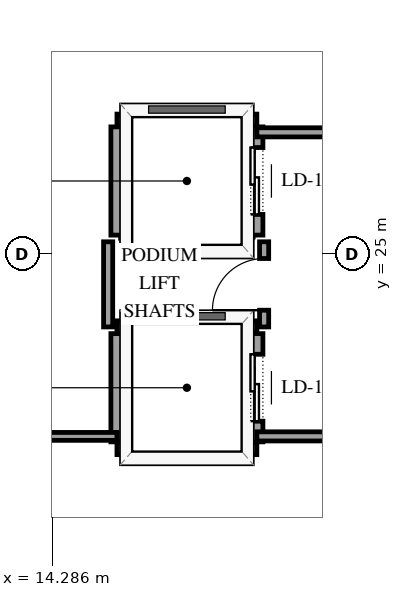
"""IFC4 building model, lengths in metres.
Left out: names, types, materials, properties, quantities, classifications, styles, units other than length and angle.
Written with IfcOpenShell. Run it as: python <this file> out.ifc"""

import sys

from ifc_helpers import new_model, si_unit, direction, frame, frame_2d, origin, place, context, subcontext, project, spatial, rectangle, extrude, element, fill, save


model = new_model("IFC4")
c1 = context("Model", 3, precision=1e-05, world=origin(), true_north=direction((0.0, 1.0)))
c2 = subcontext(c1, "Body", "Model", "MODEL_VIEW")
j1 = project(units=[si_unit("LENGTHUNIT", "METRE"), si_unit("PLANEANGLEUNIT", "RADIAN")], contexts=[c1])
p1 = place(None, origin())
s1 = spatial("IfcSite", under=j1, at=p1, CompositionType="ELEMENT")
p2 = place(p1, origin())
s2 = spatial("IfcBuilding", under=s1, at=p2, CompositionType="ELEMENT")
p3 = place(p2, frame((0.0, 0.0, 11.4)))
s3 = spatial("IfcBuildingStorey", under=s2, at=p3, CompositionType="ELEMENT", Elevation=11.4)
for number, where, z_axis, x_axis in (
    (1, (15.35, 21.8, 0.0), (0.0, 0.0, 1.0), (1.0, 0.0, 0.0)),
    (2, (15.35, 23.8, 0.0), (0.0, 0.0, 1.0), (1.0, 0.0, 0.0)),
):
    element("IfcWall", number, at=place(p3, frame(where, z_axis=z_axis, x_axis=x_axis)), inside=s3, PredefinedType="SOLIDWALL", context=c2, shape_type="SweptSolid", body=[
        extrude(rectangle(XDim=2.3, YDim=0.2, at=frame_2d((1.15, 0.0))), origin(), (0.0, 0.0, 1.0), 4.48),
    ])
p4 = place(p3, frame((15.35, 21.91, 0.0), z_axis=(0.0, 0.0, 1.0), x_axis=(0.0, 1.0, 0.0)))
e3 = element("IfcWall", 3, at=p4, inside=s3, PredefinedType="SOLIDWALL", context=c2, shape_type="SweptSolid", body=[
    extrude(rectangle(XDim=1.78, YDim=0.2, at=frame_2d((0.89, 0.0))), origin(), (0.0, 0.0, 1.0), 4.48),
])
p5 = place(p3, frame((17.65, 21.91, 0.0), z_axis=(0.0, 0.0, 1.0), x_axis=(0.0, 1.0, 0.0)))
e4 = element("IfcWall", 4, at=p5, inside=s3, PredefinedType="SOLIDWALL", context=c2, shape_type="SweptSolid", body=[
    extrude(rectangle(XDim=1.78, YDim=0.2, at=frame_2d((0.89, 0.0))), origin(), (0.0, 0.0, 1.0), 4.48),
])
p6 = place(p5, frame((0.34, 0.0, 0.0)))
e5 = element("IfcOpeningElement", 5, at=p6, cuts=e4, PredefinedType="OPENING", context=c2, shape_type="SweptSolid", body=[
    extrude(rectangle(XDim=1.1, YDim=2.15, at=frame_2d((0.55, 1.075))), frame((0.0, 0.11, 0.0), z_axis=(0.0, -1.0, 0.0), x_axis=(1.0, 0.0, 0.0)), (0.0, 0.0, 1.0), 0.22),
])
p7 = place(p3, frame((15.35, 27.2, 0.0), z_axis=(0.0, 0.0, 1.0), x_axis=(1.0, 0.0, 0.0)))
e6 = element("IfcWall", 6, at=p7, inside=s3, PredefinedType="SOLIDWALL", context=c2, shape_type="SweptSolid", body=[
    extrude(rectangle(XDim=2.3, YDim=0.2, at=frame_2d((1.15, 0.0))), origin(), (0.0, 0.0, 1.0), 4.48),
])
p8 = place(p3, frame((15.35, 25.31, 0.0), z_axis=(0.0, 0.0, 1.0), x_axis=(0.0, 1.0, 0.0)))
e7 = element("IfcWall", 7, at=p8, inside=s3, PredefinedType="SOLIDWALL", context=c2, shape_type="SweptSolid", body=[
    extrude(rectangle(XDim=1.78, YDim=0.2, at=frame_2d((0.89, 0.0))), origin(), (0.0, 0.0, 1.0), 4.48),
])
p9 = place(p3, frame((17.65, 25.31, 0.0), z_axis=(0.0, 0.0, 1.0), x_axis=(0.0, 1.0, 0.0)))
e8 = element("IfcWall", 8, at=p9, inside=s3, PredefinedType="SOLIDWALL", context=c2, shape_type="SweptSolid", body=[
    extrude(rectangle(XDim=1.78, YDim=0.2, at=frame_2d((0.89, 0.0))), origin(), (0.0, 0.0, 1.0), 4.48),
])
p10 = place(p9, frame((0.34, 0.0, 0.0)))
e9 = element("IfcOpeningElement", 9, at=p10, cuts=e8, PredefinedType="OPENING", context=c2, shape_type="SweptSolid", body=[
    extrude(rectangle(XDim=1.1, YDim=2.15, at=frame_2d((0.55, 1.075))), frame((0.0, 0.11, 0.0), z_axis=(0.0, -1.0, 0.0), x_axis=(1.0, 0.0, 0.0)), (0.0, 0.0, 1.0), 0.22),
])
p11 = place(p3, frame((0.0, 22.0, 0.0), z_axis=(0.0, 0.0, 1.0), x_axis=(1.0, 0.0, 0.0)))
e10 = element("IfcWall", 10, at=p11, inside=s3, PredefinedType="PARTITIONING", context=c2, shape_type="SweptSolid", body=[
    extrude(rectangle(XDim=15.35, YDim=0.13, at=frame_2d((7.675, 0.0))), origin(), (0.0, 0.0, 1.0), 4.48),
])
p12 = place(p3, frame((30.53, 22.0, 0.0), z_axis=(0.0, 0.0, 1.0), x_axis=(-1.0, 0.0, 0.0)))
e11 = element("IfcWall", 11, at=p12, inside=s3, PredefinedType="PARTITIONING", context=c2, shape_type="SweptSolid", body=[
    extrude(rectangle(XDim=12.88, YDim=0.15, at=frame_2d((6.44, 0.0))), origin(), (0.0, 0.0, 1.0), 4.48),
])
p13 = place(p3, frame((17.65, 27.0, 0.0), z_axis=(0.0, 0.0, 1.0), x_axis=(1.0, 0.0, 0.0)))
e12 = element("IfcWall", 12, at=p13, inside=s3, PredefinedType="PARTITIONING", context=c2, shape_type="SweptSolid", body=[
    extrude(rectangle(XDim=12.88, YDim=0.15, at=frame_2d((6.44, 0.0))), origin(), (0.0, 0.0, 1.0), 4.48),
])
p14 = place(p13, frame((5.965, 0.0, 0.0)))
e13 = element("IfcOpeningElement", 13, at=p14, cuts=e12, PredefinedType="OPENING", context=c2, shape_type="SweptSolid", body=[
    extrude(rectangle(XDim=0.92, YDim=2.12, at=frame_2d((0.46, 1.06))), frame((0.0, 0.085, 0.0), z_axis=(0.0, -1.0, 0.0), x_axis=(1.0, 0.0, 0.0)), (0.0, 0.0, 1.0), 0.17),
])
p15 = place(p3, frame((17.77, 23.8, 0.0), z_axis=(0.0, 0.0, 1.0), x_axis=(0.0, 1.0, 0.0)))
e14 = element("IfcWall", 14, at=p15, inside=s3, PredefinedType="PARTITIONING", context=c2, shape_type="SweptSolid", body=[
    extrude(rectangle(XDim=1.4, YDim=0.15, at=frame_2d((0.7, 0.0))), origin(), (0.0, 0.0, 1.0), 4.48),
])
p16 = place(p15, frame((0.275, 0.0, 0.0)))
e15 = element("IfcOpeningElement", 15, at=p16, cuts=e14, PredefinedType="OPENING", context=c2, shape_type="SweptSolid", body=[
    extrude(rectangle(XDim=0.85, YDim=2.1, at=frame_2d((0.425, 1.05))), frame((0.0, 0.085, 0.0), z_axis=(0.0, -1.0, 0.0), x_axis=(1.0, 0.0, 0.0)), (0.0, 0.0, 1.0), 0.17),
])
p17 = place(p3, frame((15.205, 23.8, 0.0), z_axis=(0.0, 0.0, 1.0), x_axis=(0.0, 1.0, 0.0)))
e16 = element("IfcWall", 16, at=p17, inside=s3, PredefinedType="PARTITIONING", context=c2, shape_type="SweptSolid", body=[
    extrude(rectangle(XDim=1.4, YDim=0.15, at=frame_2d((0.7, 0.0))), origin(), (0.0, 0.0, 1.0), 4.48),
])
p18 = place(p6, origin())
e17 = element("IfcDoor", 17, at=p18, inside=s3, OperationType="SLIDING_TO_LEFT", PredefinedType="DOOR", context=c2, shape_type="SweptSolid", body=[
    extrude(rectangle(XDim=1.1, YDim=2.15, at=frame_2d((0.55, 1.075))), frame((0.0, 0.025, 0.0), z_axis=(0.0, -1.0, 0.0), x_axis=(1.0, 0.0, 0.0)), (0.0, 0.0, 1.0), 0.05),
])
fill(e5, e17)
p19 = place(p10, origin())
e18 = element("IfcDoor", 18, at=p19, inside=s3, OperationType="SLIDING_TO_LEFT", PredefinedType="DOOR", context=c2, shape_type="SweptSolid", body=[
    extrude(rectangle(XDim=1.1, YDim=2.15, at=frame_2d((0.55, 1.075))), frame((0.0, 0.025, 0.0), z_axis=(0.0, -1.0, 0.0), x_axis=(1.0, 0.0, 0.0)), (0.0, 0.0, 1.0), 0.05),
])
fill(e9, e18)
p20 = place(p16, origin())
e19 = element("IfcDoor", 19, at=p20, inside=s3, OperationType="SINGLE_SWING_LEFT", PredefinedType="DOOR", context=c2, shape_type="SweptSolid", body=[
    extrude(rectangle(XDim=0.85, YDim=2.1, at=frame_2d((0.425, 1.05))), frame((0.0, 0.025, 0.0), z_axis=(0.0, -1.0, 0.0), x_axis=(1.0, 0.0, 0.0)), (0.0, 0.0, 1.0), 0.05),
])
fill(e15, e19)
save(model, sys.argv[1])
